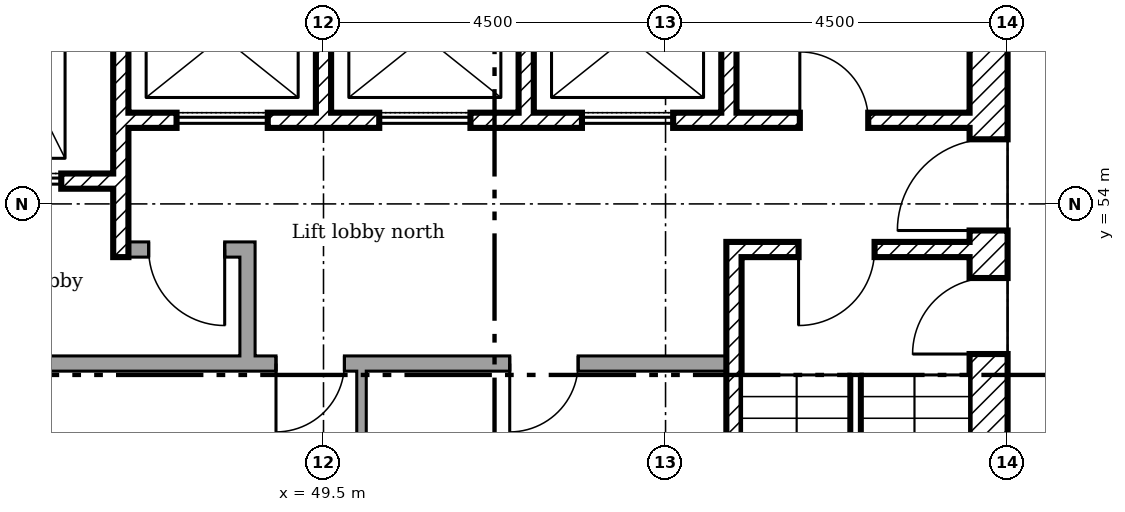
"""IFC4 building model, lengths in metres.
Left out: names, types, materials, properties, quantities, classifications, styles, units other than length and angle.
Written with IfcOpenShell. Run it as: python <this file> out.ifc"""

import sys

from ifc_helpers import new_model, si_unit, direction, frame, frame_2d, origin, place, context, subcontext, project, spatial, rectangle, extrude, element, fill, save


model = new_model("IFC4")
c1 = context("Model", 3, precision=1e-05, world=origin(), true_north=direction((0.0, 1.0)))
c2 = subcontext(c1, "Body", "Model", "MODEL_VIEW")
j1 = project(units=[si_unit("LENGTHUNIT", "METRE"), si_unit("PLANEANGLEUNIT", "RADIAN")], contexts=[c1])
p1 = place(None, origin())
s1 = spatial("IfcSite", under=j1, at=p1, CompositionType="ELEMENT")
p2 = place(p1, origin())
s2 = spatial("IfcBuilding", under=s1, at=p2, CompositionType="ELEMENT")
p3 = place(p2, frame((0.0, 0.0, 217.2)))
s3 = spatial("IfcBuildingStorey", under=s2, at=p3, CompositionType="ELEMENT", Elevation=217.2)
p4 = place(p3, frame((58.25, 40.5, 0.0), z_axis=(0.0, 0.0, 1.0), x_axis=(0.0, 1.0, 0.0)))
e1 = element("IfcWall", 1, at=p4, inside=s3, PredefinedType="SHEAR", context=c2, shape_type="SweptSolid", body=[
    extrude(rectangle(XDim=18.0, YDim=0.5, at=frame_2d((9.0, 0.0))), origin(), (0.0, 0.0, 1.0), 3.35),
])
p5 = place(p4, frame((13.15, 0.0, 0.0)))
e2 = element("IfcOpeningElement", 2, at=p5, cuts=e1, PredefinedType="OPENING", context=c2, shape_type="SweptSolid", body=[
    extrude(rectangle(XDim=1.2, YDim=2.1, at=frame_2d((0.6, 1.05))), frame((0.0, 0.26, 0.0), z_axis=(0.0, -1.0, 0.0), x_axis=(1.0, 0.0, 0.0)), (0.0, 0.0, 1.0), 0.52),
])
p6 = place(p4, frame((3.9, 0.0, 0.0)))
e3 = element("IfcOpeningElement", 3, at=p6, cuts=e1, PredefinedType="OPENING", context=c2, shape_type="SweptSolid", body=[
    extrude(rectangle(XDim=1.8, YDim=2.1, at=frame_2d((0.9, 1.05))), frame((0.0, 0.26, 0.0), z_axis=(0.0, -1.0, 0.0), x_axis=(1.0, 0.0, 0.0)), (0.0, 0.0, 1.0), 0.52),
])
p7 = place(p4, frame((11.525, 0.0, 0.0)))
e4 = element("IfcOpeningElement", 4, at=p7, cuts=e1, PredefinedType="OPENING", context=c2, shape_type="SweptSolid", body=[
    extrude(rectangle(XDim=1.0, YDim=2.1, at=frame_2d((0.5, 1.05))), frame((0.0, 0.26, 0.0), z_axis=(0.0, -1.0, 0.0), x_axis=(1.0, 0.0, 0.0)), (0.0, 0.0, 1.0), 0.52),
])
p8 = place(p3, frame((46.833, 58.0, 0.0), z_axis=(0.0, 0.0, 1.0), x_axis=(0.0, -1.0, 0.0)))
e5 = element("IfcWall", 5, at=p8, inside=s3, PredefinedType="SHEAR", context=c2, shape_type="SweptSolid", body=[
    extrude(rectangle(XDim=4.7, YDim=0.2, at=frame_2d((2.35, 0.0))), origin(), (0.0, 0.0, 1.0), 3.35),
])
for number, where, z_axis, x_axis in (
    (6, (49.5, 58.0, 0.0), (0.0, 0.0, 1.0), (0.0, -1.0, 0.0)),
    (7, (52.167, 58.0, 0.0), (0.0, 0.0, 1.0), (0.0, -1.0, 0.0)),
    (8, (54.833, 58.0, 0.0), (0.0, 0.0, 1.0), (0.0, -1.0, 0.0)),
):
    element("IfcWall", number, at=place(p3, frame(where, z_axis=z_axis, x_axis=x_axis)), inside=s3, PredefinedType="SHEAR", context=c2, shape_type="SweptSolid", body=[
        extrude(rectangle(XDim=2.8, YDim=0.2, at=frame_2d((1.4, 0.0))), origin(), (0.0, 0.0, 1.0), 3.35),
    ])
p9 = place(p3, frame((48.5, 51.9, 0.0), z_axis=(0.0, 0.0, 1.0), x_axis=(0.0, 1.0, 0.0)))
e9 = element("IfcWall", 9, at=p9, inside=s3, PredefinedType="PARTITIONING", context=c2, shape_type="SweptSolid", body=[
    extrude(rectangle(XDim=1.6, YDim=0.2, at=frame_2d((0.8, 0.0))), origin(), (0.0, 0.0, 1.0), 3.35),
])
p10 = place(p3, frame((46.933, 53.4, 0.0)))
e10 = element("IfcWall", 10, at=p10, inside=s3, PredefinedType="PARTITIONING", context=c2, shape_type="SweptSolid", body=[
    extrude(rectangle(XDim=1.467, YDim=0.2, at=frame_2d((0.733, 0.0))), origin(), (0.0, 0.0, 1.0), 3.35),
])
p11 = place(p10, frame((0.267, 0.0, 0.0)))
e11 = element("IfcOpeningElement", 11, at=p11, cuts=e10, PredefinedType="OPENING", context=c2, shape_type="SweptSolid", body=[
    extrude(rectangle(XDim=1.0, YDim=2.1, at=frame_2d((0.5, 1.05))), frame((0.0, 0.11, 0.0), z_axis=(0.0, -1.0, 0.0), x_axis=(1.0, 0.0, 0.0)), (0.0, 0.0, 1.0), 0.22),
])
p12 = place(p3, frame((46.933, 55.1, 0.0)))
e12 = element("IfcWall", 12, at=p12, inside=s3, PredefinedType="SHEAR", context=c2, shape_type="SweptSolid", body=[
    extrude(rectangle(XDim=11.067, YDim=0.2, at=frame_2d((5.533, 0.0))), origin(), (0.0, 0.0, 1.0), 3.35),
])
p13 = place(p12, frame((8.833, 0.0, 0.0)))
e13 = element("IfcOpeningElement", 13, at=p13, cuts=e12, PredefinedType="OPENING", context=c2, shape_type="SweptSolid", body=[
    extrude(rectangle(XDim=0.9, YDim=2.1, at=frame_2d((0.45, 1.05))), frame((0.0, 0.11, 0.0), z_axis=(0.0, -1.0, 0.0), x_axis=(1.0, 0.0, 0.0)), (0.0, 0.0, 1.0), 0.22),
])
p14 = place(p12, frame((0.633, 0.0, 0.0)))
e14 = element("IfcOpeningElement", 14, at=p14, cuts=e12, PredefinedType="OPENING", context=c2, shape_type="SweptSolid", body=[
    extrude(rectangle(XDim=1.2, YDim=2.1, at=frame_2d((0.6, 1.05))), frame((0.0, 0.11, 0.0), z_axis=(0.0, -1.0, 0.0), x_axis=(1.0, 0.0, 0.0)), (0.0, 0.0, 1.0), 0.22),
])
p15 = place(p12, frame((3.3, 0.0, 0.0)))
e15 = element("IfcOpeningElement", 15, at=p15, cuts=e12, PredefinedType="OPENING", context=c2, shape_type="SweptSolid", body=[
    extrude(rectangle(XDim=1.2, YDim=2.1, at=frame_2d((0.6, 1.05))), frame((0.0, 0.11, 0.0), z_axis=(0.0, -1.0, 0.0), x_axis=(1.0, 0.0, 0.0)), (0.0, 0.0, 1.0), 0.22),
])
p16 = place(p12, frame((5.967, 0.0, 0.0)))
e16 = element("IfcOpeningElement", 16, at=p16, cuts=e12, PredefinedType="OPENING", context=c2, shape_type="SweptSolid", body=[
    extrude(rectangle(XDim=1.2, YDim=2.1, at=frame_2d((0.6, 1.05))), frame((0.0, 0.11, 0.0), z_axis=(0.0, -1.0, 0.0), x_axis=(1.0, 0.0, 0.0)), (0.0, 0.0, 1.0), 0.22),
])
p17 = place(p3, frame((41.0, 54.3, 0.0)))
e17 = element("IfcWall", 17, at=p17, inside=s3, PredefinedType="SHEAR", context=c2, shape_type="SweptSolid", body=[
    extrude(rectangle(XDim=5.733, YDim=0.2, at=frame_2d((2.867, 0.0))), origin(), (0.0, 0.0, 1.0), 3.35),
])
p18 = place(p17, frame((1.283, 0.0, 0.0)))
e18 = element("IfcOpeningElement", 18, at=p18, cuts=e17, PredefinedType="OPENING", context=c2, shape_type="SweptSolid", body=[
    extrude(rectangle(XDim=1.1, YDim=2.1, at=frame_2d((0.55, 1.05))), frame((0.0, 0.11, 0.0), z_axis=(0.0, -1.0, 0.0), x_axis=(1.0, 0.0, 0.0)), (0.0, 0.0, 1.0), 0.22),
])
p19 = place(p17, frame((3.95, 0.0, 0.0)))
e19 = element("IfcOpeningElement", 19, at=p19, cuts=e17, PredefinedType="OPENING", context=c2, shape_type="SweptSolid", body=[
    extrude(rectangle(XDim=1.1, YDim=2.1, at=frame_2d((0.55, 1.05))), frame((0.0, 0.11, 0.0), z_axis=(0.0, -1.0, 0.0), x_axis=(1.0, 0.0, 0.0)), (0.0, 0.0, 1.0), 0.22),
])
p20 = place(p3, frame((54.8, 53.4, 0.0)))
e20 = element("IfcWall", 20, at=p20, inside=s3, PredefinedType="SHEAR", context=c2, shape_type="SweptSolid", body=[
    extrude(rectangle(XDim=3.2, YDim=0.2, at=frame_2d((1.6, 0.0))), origin(), (0.0, 0.0, 1.0), 3.35),
])
p21 = place(p20, frame((0.95, 0.0, 0.0)))
e21 = element("IfcOpeningElement", 21, at=p21, cuts=e20, PredefinedType="OPENING", context=c2, shape_type="SweptSolid", body=[
    extrude(rectangle(XDim=1.0, YDim=2.1, at=frame_2d((0.5, 1.05))), frame((0.0, 0.11, 0.0), z_axis=(0.0, -1.0, 0.0), x_axis=(1.0, 0.0, 0.0)), (0.0, 0.0, 1.0), 0.22),
])
p22 = place(p3, frame((54.9, 46.8, 0.0), z_axis=(0.0, 0.0, 1.0), x_axis=(0.0, 1.0, 0.0)))
e22 = element("IfcWall", 22, at=p22, inside=s3, PredefinedType="SHEAR", context=c2, shape_type="SweptSolid", body=[
    extrude(rectangle(XDim=6.5, YDim=0.2, at=frame_2d((3.25, 0.0))), origin(), (0.0, 0.0, 1.0), 3.35),
])
p23 = place(p3, frame((44.2, 51.9, 0.0)))
e23 = element("IfcWall", 23, at=p23, inside=s3, PredefinedType="PARTITIONING", context=c2, shape_type="SweptSolid", body=[
    extrude(rectangle(XDim=10.6, YDim=0.2, at=frame_2d((5.3, 0.0))), origin(), (0.0, 0.0, 1.0), 3.35),
])
p24 = place(p23, frame((4.675, 0.0, 0.0)))
e24 = element("IfcOpeningElement", 24, at=p24, cuts=e23, PredefinedType="OPENING", context=c2, shape_type="SweptSolid", body=[
    extrude(rectangle(XDim=0.9, YDim=2.1, at=frame_2d((0.45, 1.05))), frame((0.0, 0.11, 0.0), z_axis=(0.0, -1.0, 0.0), x_axis=(1.0, 0.0, 0.0)), (0.0, 0.0, 1.0), 0.22),
])
p25 = place(p23, frame((7.75, 0.0, 0.0)))
e25 = element("IfcOpeningElement", 25, at=p25, cuts=e23, PredefinedType="OPENING", context=c2, shape_type="SweptSolid", body=[
    extrude(rectangle(XDim=0.9, YDim=2.1, at=frame_2d((0.45, 1.05))), frame((0.0, 0.11, 0.0), z_axis=(0.0, -1.0, 0.0), x_axis=(1.0, 0.0, 0.0)), (0.0, 0.0, 1.0), 0.22),
])
p26 = place(p3, frame((50.0, 49.163, 0.0), z_axis=(0.0, 0.0, 1.0), x_axis=(0.0, 1.0, 0.0)))
e26 = element("IfcWall", 26, at=p26, inside=s3, PredefinedType="PARTITIONING", context=c2, shape_type="SweptSolid", body=[
    extrude(rectangle(XDim=2.637, YDim=0.125, at=frame_2d((1.319, 0.0))), origin(), (0.0, 0.0, 1.0), 3.35),
])
p27 = place(p5, origin())
e27 = element("IfcDoor", 27, at=p27, inside=s3, OperationType="SINGLE_SWING_RIGHT", PredefinedType="DOOR", context=c2, shape_type="SweptSolid", body=[
    extrude(rectangle(XDim=1.2, YDim=2.1, at=frame_2d((0.6, 1.05))), frame((0.0, 0.025, 0.0), z_axis=(0.0, -1.0, 0.0), x_axis=(1.0, 0.0, 0.0)), (0.0, 0.0, 1.0), 0.05),
])
fill(e2, e27)
p28 = place(p21, frame((1.0, 0.0, 0.0), x_axis=(-1.0, 0.0, 0.0)))
e28 = element("IfcDoor", 28, at=p28, inside=s3, OperationType="SINGLE_SWING_LEFT", PredefinedType="DOOR", context=c2, shape_type="SweptSolid", body=[
    extrude(rectangle(XDim=1.0, YDim=2.1, at=frame_2d((0.5, 1.05))), frame((0.0, 0.025, 0.0), z_axis=(0.0, -1.0, 0.0), x_axis=(1.0, 0.0, 0.0)), (0.0, 0.0, 1.0), 0.05),
])
fill(e21, e28)
p29 = place(p7, origin())
e29 = element("IfcDoor", 29, at=p29, inside=s3, OperationType="SINGLE_SWING_RIGHT", PredefinedType="DOOR", context=c2, shape_type="SweptSolid", body=[
    extrude(rectangle(XDim=1.0, YDim=2.1, at=frame_2d((0.5, 1.05))), frame((0.0, 0.025, 0.0), z_axis=(0.0, -1.0, 0.0), x_axis=(1.0, 0.0, 0.0)), (0.0, 0.0, 1.0), 0.05),
])
fill(e4, e29)
p30 = place(p11, frame((1.0, 0.0, 0.0), x_axis=(-1.0, 0.0, 0.0)))
e30 = element("IfcDoor", 30, at=p30, inside=s3, OperationType="SINGLE_SWING_RIGHT", PredefinedType="DOOR", context=c2, shape_type="SweptSolid", body=[
    extrude(rectangle(XDim=1.0, YDim=2.1, at=frame_2d((0.5, 1.05))), frame((0.0, 0.025, 0.0), z_axis=(0.0, -1.0, 0.0), x_axis=(1.0, 0.0, 0.0)), (0.0, 0.0, 1.0), 0.05),
])
fill(e11, e30)
p31 = place(p13, origin())
e31 = element("IfcDoor", 31, at=p31, inside=s3, OperationType="SINGLE_SWING_RIGHT", PredefinedType="DOOR", context=c2, shape_type="SweptSolid", body=[
    extrude(rectangle(XDim=0.9, YDim=2.1, at=frame_2d((0.45, 1.05))), frame((0.0, 0.025, 0.0), z_axis=(0.0, -1.0, 0.0), x_axis=(1.0, 0.0, 0.0)), (0.0, 0.0, 1.0), 0.05),
])
fill(e13, e31)
p32 = place(p24, frame((0.9, 0.0, 0.0), x_axis=(-1.0, 0.0, 0.0)))
e32 = element("IfcDoor", 32, at=p32, inside=s3, OperationType="SINGLE_SWING_LEFT", PredefinedType="DOOR", context=c2, shape_type="SweptSolid", body=[
    extrude(rectangle(XDim=0.9, YDim=2.1, at=frame_2d((0.45, 1.05))), frame((0.0, 0.025, 0.0), z_axis=(0.0, -1.0, 0.0), x_axis=(1.0, 0.0, 0.0)), (0.0, 0.0, 1.0), 0.05),
])
fill(e24, e32)
p33 = place(p25, frame((0.9, 0.0, 0.0), x_axis=(-1.0, 0.0, 0.0)))
e33 = element("IfcDoor", 33, at=p33, inside=s3, OperationType="SINGLE_SWING_LEFT", PredefinedType="DOOR", context=c2, shape_type="SweptSolid", body=[
    extrude(rectangle(XDim=0.9, YDim=2.1, at=frame_2d((0.45, 1.05))), frame((0.0, 0.025, 0.0), z_axis=(0.0, -1.0, 0.0), x_axis=(1.0, 0.0, 0.0)), (0.0, 0.0, 1.0), 0.05),
])
fill(e25, e33)
p34 = place(p19, origin())
e34 = element("IfcDoor", 34, at=p34, inside=s3, OperationType="SLIDING_TO_LEFT", PredefinedType="DOOR", context=c2, shape_type="SweptSolid", body=[
    extrude(rectangle(XDim=1.1, YDim=2.1, at=frame_2d((0.55, 1.05))), frame((0.0, 0.025, 0.0), z_axis=(0.0, -1.0, 0.0), x_axis=(1.0, 0.0, 0.0)), (0.0, 0.0, 1.0), 0.05),
])
fill(e19, e34)
p35 = place(p14, origin())
e35 = element("IfcDoor", 35, at=p35, inside=s3, OperationType="SLIDING_TO_LEFT", PredefinedType="DOOR", context=c2, shape_type="SweptSolid", body=[
    extrude(rectangle(XDim=1.2, YDim=2.1, at=frame_2d((0.6, 1.05))), frame((0.0, 0.025, 0.0), z_axis=(0.0, -1.0, 0.0), x_axis=(1.0, 0.0, 0.0)), (0.0, 0.0, 1.0), 0.05),
])
fill(e14, e35)
p36 = place(p15, origin())
e36 = element("IfcDoor", 36, at=p36, inside=s3, OperationType="SLIDING_TO_LEFT", PredefinedType="DOOR", context=c2, shape_type="SweptSolid", body=[
    extrude(rectangle(XDim=1.2, YDim=2.1, at=frame_2d((0.6, 1.05))), frame((0.0, 0.025, 0.0), z_axis=(0.0, -1.0, 0.0), x_axis=(1.0, 0.0, 0.0)), (0.0, 0.0, 1.0), 0.05),
])
fill(e15, e36)
p37 = place(p16, origin())
e37 = element("IfcDoor", 37, at=p37, inside=s3, OperationType="SLIDING_TO_LEFT", PredefinedType="DOOR", context=c2, shape_type="SweptSolid", body=[
    extrude(rectangle(XDim=1.2, YDim=2.1, at=frame_2d((0.6, 1.05))), frame((0.0, 0.025, 0.0), z_axis=(0.0, -1.0, 0.0), x_axis=(1.0, 0.0, 0.0)), (0.0, 0.0, 1.0), 0.05),
])
fill(e16, e37)
save(model, sys.argv[1])
